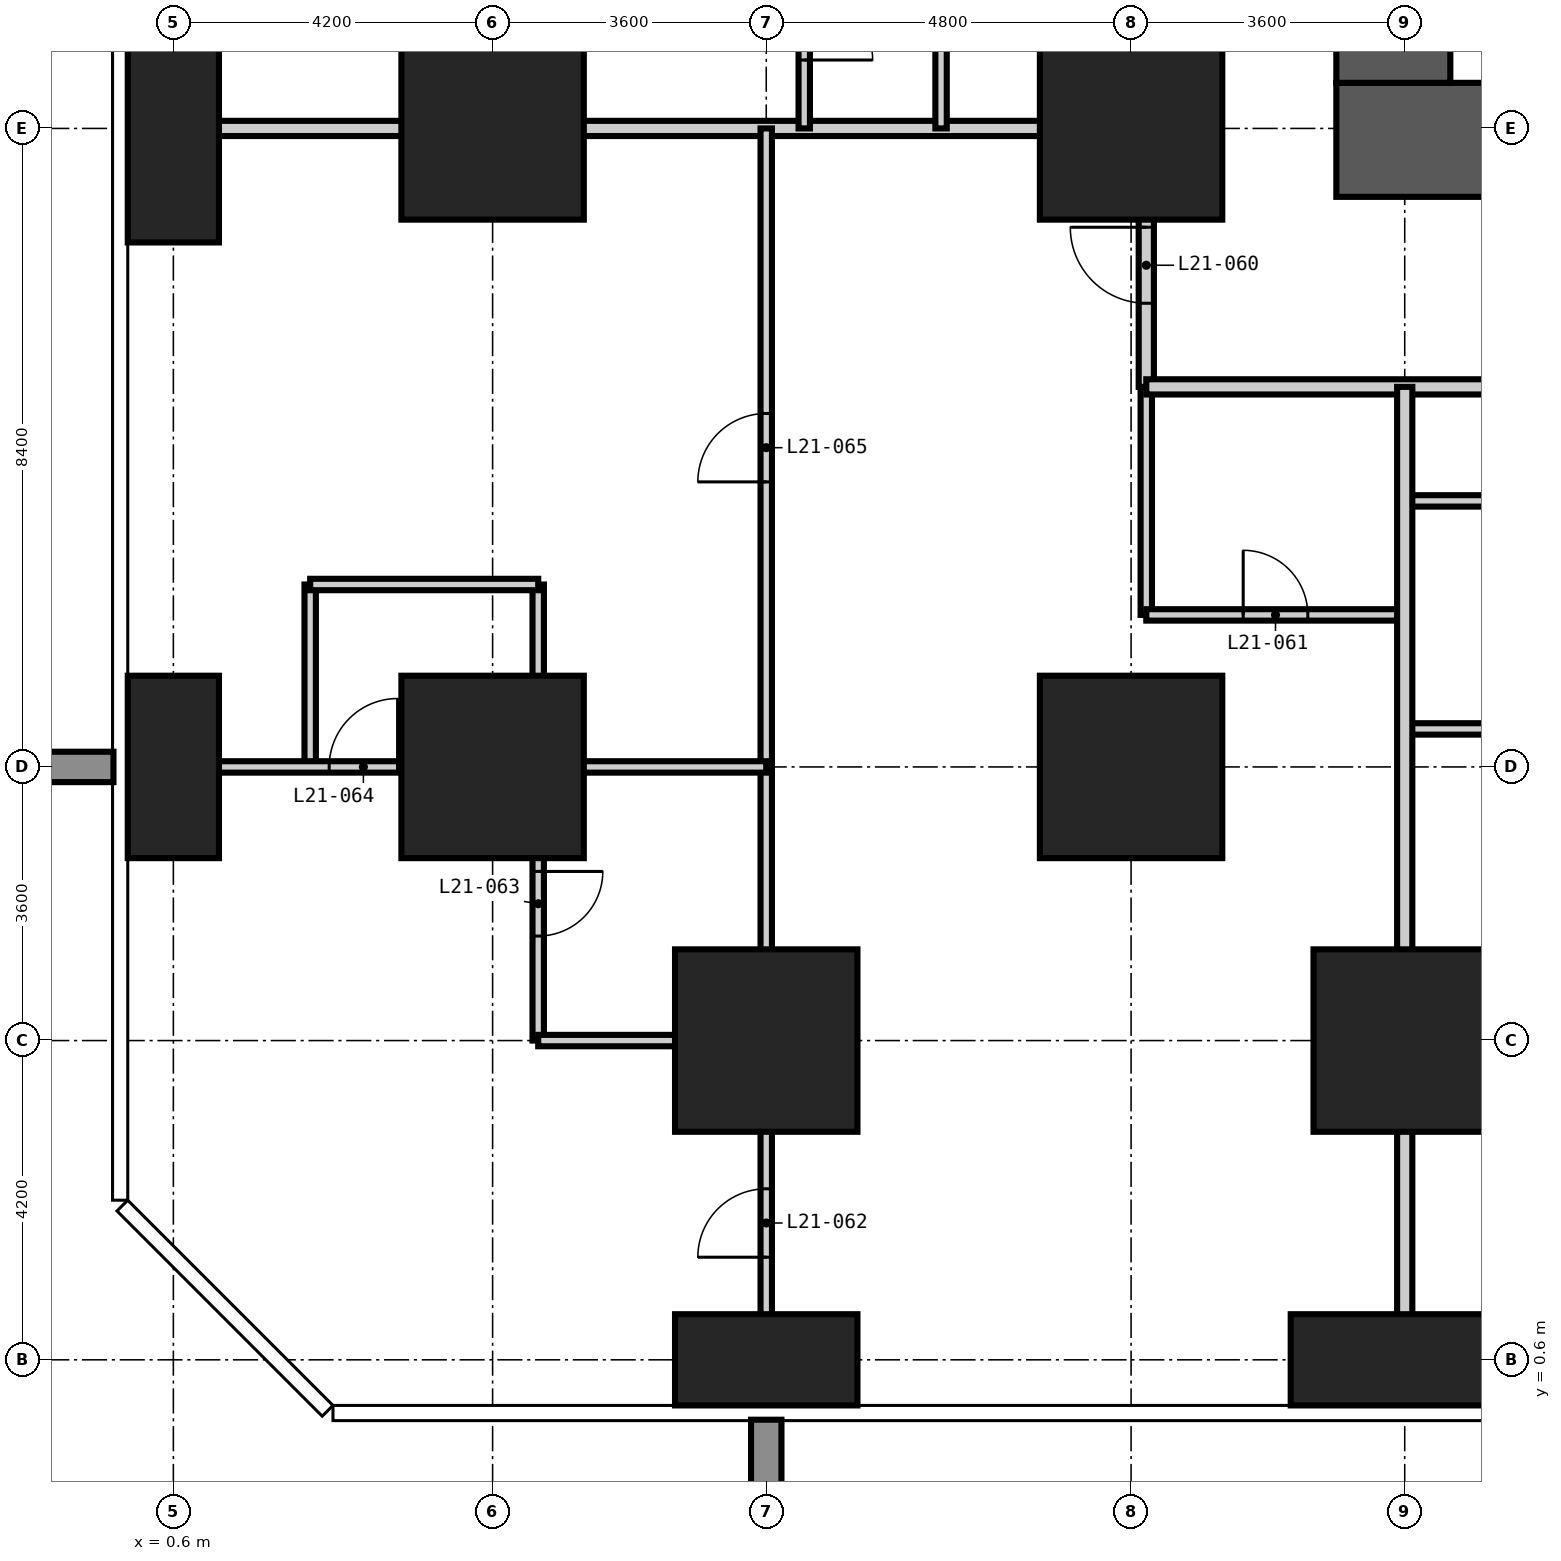
"""IFC4 building model, lengths in metres.
Left out: names, types, materials, properties, quantities, classifications, styles, units other than length and angle.
Written with IfcOpenShell. Run it as: python <this file> out.ifc"""

import sys

from ifc_helpers import new_model, si_unit, direction, frame, frame_2d, origin, origin_2d, place, context, subcontext, project, spatial, rectangle, extrude, element, fill, save


model = new_model("IFC4")
c1 = context("Model", 3, precision=1e-05, world=origin(), true_north=direction((0.0, 1.0)))
c2 = subcontext(c1, "Body", "Model", "MODEL_VIEW")
j1 = project(units=[si_unit("LENGTHUNIT", "METRE"), si_unit("PLANEANGLEUNIT", "RADIAN")], contexts=[c1])
p1 = place(None, origin())
s1 = spatial("IfcSite", under=j1, at=p1, CompositionType="ELEMENT")
p2 = place(p1, origin())
s2 = spatial("IfcBuilding", under=s1, at=p2, CompositionType="ELEMENT")
p3 = place(p2, frame((0.0, 0.0, 84.6)))
s3 = spatial("IfcBuildingStorey", under=s2, at=p3, CompositionType="ELEMENT", Elevation=84.6)
p4 = place(p3, frame((0.6, 8.4, -0.35), z_axis=(0.0, 0.0, 1.0), x_axis=(1.0, 0.0, 0.0)))
e1 = element("IfcColumn", 1, at=p4, inside=s3, PredefinedType="COLUMN", context=c2, shape_type="SweptSolid", body=[
    extrude(rectangle(XDim=1.2, YDim=2.4, at=origin_2d()), origin(), (0.0, 0.0, 1.0), 3.55),
])
p5 = place(p3, frame((0.6, 16.8, -0.35), z_axis=(0.0, 0.0, 1.0), x_axis=(1.0, 0.0, 0.0)))
e2 = element("IfcColumn", 2, at=p5, inside=s3, PredefinedType="COLUMN", context=c2, shape_type="SweptSolid", body=[
    extrude(rectangle(XDim=1.2, YDim=3.0, at=origin_2d()), origin(), (0.0, 0.0, 1.0), 3.55),
])
for number, where, z_axis, x_axis in (
    (3, (4.8, 8.4, -0.35), (0.0, 0.0, 1.0), (1.0, 0.0, 0.0)),
    (4, (4.8, 16.8, -0.35), (0.0, 0.0, 1.0), (1.0, 0.0, 0.0)),
):
    element("IfcColumn", number, at=place(p3, frame(where, z_axis=z_axis, x_axis=x_axis)), inside=s3, PredefinedType="COLUMN", context=c2, shape_type="SweptSolid", body=[
        extrude(rectangle(XDim=2.4, YDim=2.4, at=origin_2d()), origin(), (0.0, 0.0, 1.0), 3.55),
    ])
p6 = place(p3, frame((8.4, 0.6, -0.35), z_axis=(0.0, 0.0, 1.0), x_axis=(1.0, 0.0, 0.0)))
e5 = element("IfcColumn", 5, at=p6, inside=s3, PredefinedType="COLUMN", context=c2, shape_type="SweptSolid", body=[
    extrude(rectangle(XDim=2.4, YDim=1.2, at=origin_2d()), origin(), (0.0, 0.0, 1.0), 3.55),
])
for number, where, z_axis, x_axis in (
    (6, (8.4, 4.8, -0.35), (0.0, 0.0, 1.0), (1.0, 0.0, 0.0)),
    (7, (13.2, 8.4, -0.35), (0.0, 0.0, 1.0), (1.0, 0.0, 0.0)),
    (8, (13.2, 16.8, -0.35), (0.0, 0.0, 1.0), (1.0, 0.0, 0.0)),
):
    element("IfcColumn", number, at=place(p3, frame(where, z_axis=z_axis, x_axis=x_axis)), inside=s3, PredefinedType="COLUMN", context=c2, shape_type="SweptSolid", body=[
        extrude(rectangle(XDim=2.4, YDim=2.4, at=origin_2d()), origin(), (0.0, 0.0, 1.0), 3.55),
    ])
p7 = place(p3, frame((16.8, 0.6, -0.35), z_axis=(0.0, 0.0, 1.0), x_axis=(1.0, 0.0, 0.0)))
e9 = element("IfcColumn", 9, at=p7, inside=s3, PredefinedType="COLUMN", context=c2, shape_type="SweptSolid", body=[
    extrude(rectangle(XDim=3.0, YDim=1.2, at=origin_2d()), origin(), (0.0, 0.0, 1.0), 3.55),
])
p8 = place(p3, frame((16.8, 4.8, -0.35), z_axis=(0.0, 0.0, 1.0), x_axis=(1.0, 0.0, 0.0)))
e10 = element("IfcColumn", 10, at=p8, inside=s3, PredefinedType="COLUMN", context=c2, shape_type="SweptSolid", body=[
    extrude(rectangle(XDim=2.4, YDim=2.4, at=origin_2d()), origin(), (0.0, 0.0, 1.0), 3.55),
])
p9 = place(p3, frame((15.9, 16.65, -0.35), z_axis=(0.0, 0.0, 1.0), x_axis=(1.0, 0.0, 0.0)))
e11 = element("IfcWall", 11, at=p9, inside=s3, PredefinedType="SHEAR", context=c2, shape_type="SweptSolid", body=[
    extrude(rectangle(XDim=27.0, YDim=1.5, at=frame_2d((13.5, 0.0))), origin(), (0.0, 0.0, 1.0), 3.55),
])
p10 = place(p9, frame((13.0, 0.0, 0.35)))
e12 = element("IfcOpeningElement", 12, at=p10, cuts=e11, PredefinedType="OPENING", context=c2, shape_type="SweptSolid", body=[
    extrude(rectangle(XDim=1.0, YDim=2.1, at=frame_2d((0.5, 1.05))), frame((0.0, 0.76, 0.0), z_axis=(0.0, -1.0, 0.0), x_axis=(1.0, 0.0, 0.0)), (0.0, 0.0, 1.0), 1.52),
])
p11 = place(p9, frame((19.3, 0.0, 0.35)))
e13 = element("IfcOpeningElement", 13, at=p11, cuts=e11, PredefinedType="OPENING", context=c2, shape_type="SweptSolid", body=[
    extrude(rectangle(XDim=1.0, YDim=2.1, at=frame_2d((0.5, 1.05))), frame((0.0, 0.76, 0.0), z_axis=(0.0, -1.0, 0.0), x_axis=(1.0, 0.0, 0.0)), (0.0, 0.0, 1.0), 1.52),
])
p12 = place(p3, frame((16.65, 41.4, -0.35), z_axis=(0.0, 0.0, 1.0), x_axis=(0.0, -1.0, 0.0)))
e14 = element("IfcWall", 14, at=p12, inside=s3, PredefinedType="SHEAR", context=c2, shape_type="SweptSolid", body=[
    extrude(rectangle(XDim=24.0, YDim=1.5, at=frame_2d((12.0, 0.0))), origin(), (0.0, 0.0, 1.0), 3.55),
])
p13 = place(p12, frame((11.1, 0.0, 0.35)))
e15 = element("IfcOpeningElement", 15, at=p13, cuts=e14, PredefinedType="OPENING", context=c2, shape_type="SweptSolid", body=[
    extrude(rectangle(XDim=1.8, YDim=2.2, at=frame_2d((0.9, 1.1))), frame((0.0, 0.76, 0.0), z_axis=(0.0, -1.0, 0.0), x_axis=(1.0, 0.0, 0.0)), (0.0, 0.0, 1.0), 1.52),
])
p14 = place(p12, frame((19.9, 0.0, 0.35)))
e16 = element("IfcOpeningElement", 16, at=p14, cuts=e14, PredefinedType="OPENING", context=c2, shape_type="SweptSolid", body=[
    extrude(rectangle(XDim=1.0, YDim=2.1, at=frame_2d((0.5, 1.05))), frame((0.0, 0.76, 0.0), z_axis=(0.0, -1.0, 0.0), x_axis=(1.0, 0.0, 0.0)), (0.0, 0.0, 1.0), 1.52),
])
p15 = place(p12, frame((5.2, 0.0, 0.35)))
e17 = element("IfcOpeningElement", 17, at=p15, cuts=e14, PredefinedType="OPENING", context=c2, shape_type="SweptSolid", body=[
    extrude(rectangle(XDim=1.0, YDim=2.1, at=frame_2d((0.5, 1.05))), frame((0.0, 0.76, 0.0), z_axis=(0.0, -1.0, 0.0), x_axis=(1.0, 0.0, 0.0)), (0.0, 0.0, 1.0), 1.52),
])
p16 = place(p3, frame((5.4, 4.8, 0.0), z_axis=(0.0, 0.0, 1.0), x_axis=(0.0, 1.0, 0.0)))
e18 = element("IfcWall", 18, at=p16, inside=s3, PredefinedType="PARTITIONING", context=c2, shape_type="SweptSolid", body=[
    extrude(rectangle(XDim=3.6, YDim=0.15, at=frame_2d((1.8, 0.0))), origin(), (0.0, 0.0, 1.0), 3.2),
])
p17 = place(p16, frame((1.375, 0.0, 0.0)))
e19 = element("IfcOpeningElement", 19, at=p17, cuts=e18, PredefinedType="OPENING", context=c2, shape_type="SweptSolid", body=[
    extrude(rectangle(XDim=0.85, YDim=2.1, at=frame_2d((0.425, 1.05))), frame((0.0, 0.085, 0.0), z_axis=(0.0, -1.0, 0.0), x_axis=(1.0, 0.0, 0.0)), (0.0, 0.0, 1.0), 0.17),
])
for number, where, z_axis, x_axis in (
    (20, (13.4, 10.4, 0.0), (0.0, 0.0, 1.0), (0.0, 1.0, 0.0)),
    (21, (5.4, 4.8, 0.0), (0.0, 0.0, 1.0), (1.0, 0.0, 0.0)),
):
    element("IfcWall", number, at=place(p3, frame(where, z_axis=z_axis, x_axis=x_axis)), inside=s3, PredefinedType="PARTITIONING", context=c2, shape_type="SweptSolid", body=[
        extrude(rectangle(XDim=3.0, YDim=0.15, at=frame_2d((1.5, 0.0))), origin(), (0.0, 0.0, 1.0), 3.2),
    ])
p18 = place(p3, frame((16.8, 8.9, 0.0), z_axis=(0.0, 0.0, 1.0), x_axis=(1.0, 0.0, 0.0)))
e22 = element("IfcWall", 22, at=p18, inside=s3, PredefinedType="PARTITIONING", context=c2, shape_type="SweptSolid", body=[
    extrude(rectangle(XDim=2.7, YDim=0.15, at=frame_2d((1.35, 0.0))), origin(), (0.0, 0.0, 1.0), 3.2),
])
p19 = place(p3, frame((13.4, 10.4, 0.0), z_axis=(0.0, 0.0, 1.0), x_axis=(1.0, 0.0, 0.0)))
e23 = element("IfcWall", 23, at=p19, inside=s3, PredefinedType="PARTITIONING", context=c2, shape_type="SweptSolid", body=[
    extrude(rectangle(XDim=3.4, YDim=0.15, at=frame_2d((1.7, 0.0))), origin(), (0.0, 0.0, 1.0), 3.2),
])
p20 = place(p19, frame((1.275, 0.0, 0.0)))
e24 = element("IfcOpeningElement", 24, at=p20, cuts=e23, PredefinedType="OPENING", context=c2, shape_type="SweptSolid", body=[
    extrude(rectangle(XDim=0.85, YDim=2.1, at=frame_2d((0.425, 1.05))), frame((0.0, 0.085, 0.0), z_axis=(0.0, -1.0, 0.0), x_axis=(1.0, 0.0, 0.0)), (0.0, 0.0, 1.0), 0.17),
])
p21 = place(p3, frame((16.8, 11.9, 0.0), z_axis=(0.0, 0.0, 1.0), x_axis=(1.0, 0.0, 0.0)))
e25 = element("IfcWall", 25, at=p21, inside=s3, PredefinedType="PARTITIONING", context=c2, shape_type="SweptSolid", body=[
    extrude(rectangle(XDim=2.7, YDim=0.15, at=frame_2d((1.35, 0.0))), origin(), (0.0, 0.0, 1.0), 3.2),
])
p22 = place(p3, frame((13.4, 13.4, 0.0), z_axis=(0.0, 0.0, 1.0), x_axis=(0.0, 1.0, 0.0)))
e26 = element("IfcWall", 26, at=p22, inside=s3, PredefinedType="PARTITIONING", context=c2, shape_type="SweptSolid", body=[
    extrude(rectangle(XDim=22.6, YDim=0.2, at=frame_2d((11.3, 0.0))), origin(), (0.0, 0.0, 1.0), 3.2),
])
p23 = place(p22, frame((6.35, 0.0, 0.0)))
e27 = element("IfcOpeningElement", 27, at=p23, cuts=e26, PredefinedType="OPENING", context=c2, shape_type="SweptSolid", body=[
    extrude(rectangle(XDim=1.0, YDim=2.2, at=frame_2d((0.5, 1.1))), frame((0.0, 0.11, 0.0), z_axis=(0.0, -1.0, 0.0), x_axis=(1.0, 0.0, 0.0)), (0.0, 0.0, 1.0), 0.22),
])
p24 = place(p22, frame((13.1, 0.0, 0.0)))
e28 = element("IfcOpeningElement", 28, at=p24, cuts=e26, PredefinedType="OPENING", context=c2, shape_type="SweptSolid", body=[
    extrude(rectangle(XDim=1.0, YDim=2.2, at=frame_2d((0.5, 1.1))), frame((0.0, 0.11, 0.0), z_axis=(0.0, -1.0, 0.0), x_axis=(1.0, 0.0, 0.0)), (0.0, 0.0, 1.0), 0.22),
])
p25 = place(p22, frame((16.25, 0.0, 0.0)))
e29 = element("IfcOpeningElement", 29, at=p25, cuts=e26, PredefinedType="OPENING", context=c2, shape_type="SweptSolid", body=[
    extrude(rectangle(XDim=1.0, YDim=2.2, at=frame_2d((0.5, 1.1))), frame((0.0, 0.11, 0.0), z_axis=(0.0, -1.0, 0.0), x_axis=(1.0, 0.0, 0.0)), (0.0, 0.0, 1.0), 0.22),
])
p26 = place(p22, frame((1.1, 0.0, 0.0)))
e30 = element("IfcOpeningElement", 30, at=p26, cuts=e26, PredefinedType="OPENING", context=c2, shape_type="SweptSolid", body=[
    extrude(rectangle(XDim=1.0, YDim=2.2, at=frame_2d((0.5, 1.1))), frame((0.0, 0.11, 0.0), z_axis=(0.0, -1.0, 0.0), x_axis=(1.0, 0.0, 0.0)), (0.0, 0.0, 1.0), 0.22),
])
p27 = place(p3, frame((46.0, 13.4, 0.0), z_axis=(0.0, 0.0, 1.0), x_axis=(-1.0, 0.0, 0.0)))
e31 = element("IfcWall", 31, at=p27, inside=s3, PredefinedType="PARTITIONING", context=c2, shape_type="SweptSolid", body=[
    extrude(rectangle(XDim=32.6, YDim=0.2, at=frame_2d((16.3, 0.0))), origin(), (0.0, 0.0, 1.0), 3.2),
])
p28 = place(p27, frame((26.6, 0.0, 0.0)))
e32 = element("IfcOpeningElement", 32, at=p28, cuts=e31, PredefinedType="OPENING", context=c2, shape_type="SweptSolid", body=[
    extrude(rectangle(XDim=1.0, YDim=2.2, at=frame_2d((0.5, 1.1))), frame((0.0, 0.11, 0.0), z_axis=(0.0, -1.0, 0.0), x_axis=(1.0, 0.0, 0.0)), (0.0, 0.0, 1.0), 0.22),
])
p29 = place(p27, frame((19.1, 0.0, 0.0)))
e33 = element("IfcOpeningElement", 33, at=p29, cuts=e31, PredefinedType="OPENING", context=c2, shape_type="SweptSolid", body=[
    extrude(rectangle(XDim=1.0, YDim=2.2, at=frame_2d((0.5, 1.1))), frame((0.0, 0.11, 0.0), z_axis=(0.0, -1.0, 0.0), x_axis=(1.0, 0.0, 0.0)), (0.0, 0.0, 1.0), 0.22),
])
p30 = place(p27, frame((13.1, 0.0, 0.0)))
e34 = element("IfcOpeningElement", 34, at=p30, cuts=e31, PredefinedType="OPENING", context=c2, shape_type="SweptSolid", body=[
    extrude(rectangle(XDim=1.0, YDim=2.2, at=frame_2d((0.5, 1.1))), frame((0.0, 0.11, 0.0), z_axis=(0.0, -1.0, 0.0), x_axis=(1.0, 0.0, 0.0)), (0.0, 0.0, 1.0), 0.22),
])
p31 = place(p27, frame((5.6, 0.0, 0.0)))
e35 = element("IfcOpeningElement", 35, at=p31, cuts=e31, PredefinedType="OPENING", context=c2, shape_type="SweptSolid", body=[
    extrude(rectangle(XDim=1.0, YDim=2.2, at=frame_2d((0.5, 1.1))), frame((0.0, 0.11, 0.0), z_axis=(0.0, -1.0, 0.0), x_axis=(1.0, 0.0, 0.0)), (0.0, 0.0, 1.0), 0.22),
])
for number, where, z_axis, x_axis in (
    (36, (16.8, -0.008, 0.0), (0.0, 0.0, 1.0), (0.0, 1.0, 0.0)),
    (37, (-0.008, 16.8, 0.0), (0.0, 0.0, 1.0), (1.0, 0.0, 0.0)),
):
    element("IfcWall", number, at=place(p3, frame(where, z_axis=z_axis, x_axis=x_axis)), inside=s3, PredefinedType="PARTITIONING", context=c2, shape_type="SweptSolid", body=[
        extrude(rectangle(XDim=13.408, YDim=0.2, at=frame_2d((6.704, 0.0))), origin(), (0.0, 0.0, 1.0), 3.2),
    ])
for number, where, z_axis, x_axis in (
    (38, (2.4, 8.4, 0.0), (0.0, 0.0, 1.0), (0.0, 1.0, 0.0)),
    (39, (5.4, 8.4, 0.0), (0.0, 0.0, 1.0), (0.0, 1.0, 0.0)),
):
    element("IfcWall", number, at=place(p3, frame(where, z_axis=z_axis, x_axis=x_axis)), inside=s3, PredefinedType="PARTITIONING", context=c2, shape_type="SweptSolid", body=[
        extrude(rectangle(XDim=2.4, YDim=0.15, at=frame_2d((1.2, 0.0))), origin(), (0.0, 0.0, 1.0), 3.2),
    ])
p32 = place(p3, frame((8.4, -0.008, 0.0), z_axis=(0.0, 0.0, 1.0), x_axis=(0.0, 1.0, 0.0)))
e40 = element("IfcWall", 40, at=p32, inside=s3, PredefinedType="PARTITIONING", context=c2, shape_type="SweptSolid", body=[
    extrude(rectangle(XDim=16.808, YDim=0.15, at=frame_2d((8.404, 0.0))), origin(), (0.0, 0.0, 1.0), 3.2),
])
p33 = place(p32, frame((1.958, 0.0, 0.0)))
e41 = element("IfcOpeningElement", 41, at=p33, cuts=e40, PredefinedType="OPENING", context=c2, shape_type="SweptSolid", body=[
    extrude(rectangle(XDim=0.9, YDim=2.1, at=frame_2d((0.45, 1.05))), frame((0.0, 0.085, 0.0), z_axis=(0.0, -1.0, 0.0), x_axis=(1.0, 0.0, 0.0)), (0.0, 0.0, 1.0), 0.17),
])
p34 = place(p32, frame((12.158, 0.0, 0.0)))
e42 = element("IfcOpeningElement", 42, at=p34, cuts=e40, PredefinedType="OPENING", context=c2, shape_type="SweptSolid", body=[
    extrude(rectangle(XDim=0.9, YDim=2.1, at=frame_2d((0.45, 1.05))), frame((0.0, 0.085, 0.0), z_axis=(0.0, -1.0, 0.0), x_axis=(1.0, 0.0, 0.0)), (0.0, 0.0, 1.0), 0.17),
])
p35 = place(p3, frame((8.9, 16.8, 0.0), z_axis=(0.0, 0.0, 1.0), x_axis=(0.0, 1.0, 0.0)))
e43 = element("IfcWall", 43, at=p35, inside=s3, PredefinedType="PARTITIONING", context=c2, shape_type="SweptSolid", body=[
    extrude(rectangle(XDim=2.7, YDim=0.15, at=frame_2d((1.35, 0.0))), origin(), (0.0, 0.0, 1.0), 3.2),
])
p36 = place(p35, frame((0.9, 0.0, 0.0)))
e44 = element("IfcOpeningElement", 44, at=p36, cuts=e43, PredefinedType="OPENING", context=c2, shape_type="SweptSolid", body=[
    extrude(rectangle(XDim=0.9, YDim=2.1, at=frame_2d((0.45, 1.05))), frame((0.0, 0.085, 0.0), z_axis=(0.0, -1.0, 0.0), x_axis=(1.0, 0.0, 0.0)), (0.0, 0.0, 1.0), 0.17),
])
p37 = place(p3, frame((10.7, 16.8, 0.0), z_axis=(0.0, 0.0, 1.0), x_axis=(0.0, 1.0, 0.0)))
e45 = element("IfcWall", 45, at=p37, inside=s3, PredefinedType="PARTITIONING", context=c2, shape_type="SweptSolid", body=[
    extrude(rectangle(XDim=2.7, YDim=0.15, at=frame_2d((1.35, 0.0))), origin(), (0.0, 0.0, 1.0), 3.2),
])
p38 = place(p3, frame((-0.008, 8.4, 0.0), z_axis=(0.0, 0.0, 1.0), x_axis=(1.0, 0.0, 0.0)))
e46 = element("IfcWall", 46, at=p38, inside=s3, PredefinedType="PARTITIONING", context=c2, shape_type="SweptSolid", body=[
    extrude(rectangle(XDim=8.408, YDim=0.15, at=frame_2d((4.204, 0.0))), origin(), (0.0, 0.0, 1.0), 3.2),
])
p39 = place(p38, frame((2.658, 0.0, 0.0)))
e47 = element("IfcOpeningElement", 47, at=p39, cuts=e46, PredefinedType="OPENING", context=c2, shape_type="SweptSolid", body=[
    extrude(rectangle(XDim=0.9, YDim=2.1, at=frame_2d((0.45, 1.05))), frame((0.0, 0.085, 0.0), z_axis=(0.0, -1.0, 0.0), x_axis=(1.0, 0.0, 0.0)), (0.0, 0.0, 1.0), 0.17),
])
p40 = place(p3, frame((2.4, 10.8, 0.0), z_axis=(0.0, 0.0, 1.0), x_axis=(1.0, 0.0, 0.0)))
e48 = element("IfcWall", 48, at=p40, inside=s3, PredefinedType="PARTITIONING", context=c2, shape_type="SweptSolid", body=[
    extrude(rectangle(XDim=3.0, YDim=0.15, at=frame_2d((1.5, 0.0))), origin(), (0.0, 0.0, 1.0), 3.2),
])
p41 = place(p36, frame((0.9, 0.0, 0.0), z_axis=(0.0, 0.0, 1.0), x_axis=(-1.0, 0.0, 0.0)))
e49 = element("IfcDoor", 49, at=p41, inside=s3, OperationType="SINGLE_SWING_RIGHT", PredefinedType="DOOR", context=c2, shape_type="SweptSolid", body=[
    extrude(rectangle(XDim=0.9, YDim=2.1, at=frame_2d((0.45, 1.05))), frame((0.0, 0.025, 0.0), z_axis=(0.0, -1.0, 0.0), x_axis=(1.0, 0.0, 0.0)), (0.0, 0.0, 1.0), 0.05),
])
fill(e44, e49)
p42 = place(p26, origin())
e50 = element("IfcDoor", 50, at=p42, inside=s3, OperationType="SINGLE_SWING_RIGHT", PredefinedType="DOOR", context=c2, shape_type="SweptSolid", body=[
    extrude(rectangle(XDim=1.0, YDim=2.2, at=frame_2d((0.5, 1.1))), frame((0.0, 0.025, 0.0), z_axis=(0.0, -1.0, 0.0), x_axis=(1.0, 0.0, 0.0)), (0.0, 0.0, 1.0), 0.05),
])
fill(e30, e50)
p43 = place(p20, origin())
e51 = element("IfcDoor", 51, at=p43, inside=s3, OperationType="SINGLE_SWING_LEFT", PredefinedType="DOOR", context=c2, shape_type="SweptSolid", body=[
    extrude(rectangle(XDim=0.85, YDim=2.1, at=frame_2d((0.425, 1.05))), frame((0.0, 0.025, 0.0), z_axis=(0.0, -1.0, 0.0), x_axis=(1.0, 0.0, 0.0)), (0.0, 0.0, 1.0), 0.05),
])
fill(e24, e51)
p44 = place(p33, origin())
e52 = element("IfcDoor", 52, at=p44, inside=s3, OperationType="SINGLE_SWING_LEFT", PredefinedType="DOOR", context=c2, shape_type="SweptSolid", body=[
    extrude(rectangle(XDim=0.9, YDim=2.1, at=frame_2d((0.45, 1.05))), frame((0.0, 0.025, 0.0), z_axis=(0.0, -1.0, 0.0), x_axis=(1.0, 0.0, 0.0)), (0.0, 0.0, 1.0), 0.05),
])
fill(e41, e52)
p45 = place(p17, frame((0.85, 0.0, 0.0), z_axis=(0.0, 0.0, 1.0), x_axis=(-1.0, 0.0, 0.0)))
e53 = element("IfcDoor", 53, at=p45, inside=s3, OperationType="SINGLE_SWING_LEFT", PredefinedType="DOOR", context=c2, shape_type="SweptSolid", body=[
    extrude(rectangle(XDim=0.85, YDim=2.1, at=frame_2d((0.425, 1.05))), frame((0.0, 0.025, 0.0), z_axis=(0.0, -1.0, 0.0), x_axis=(1.0, 0.0, 0.0)), (0.0, 0.0, 1.0), 0.05),
])
fill(e19, e53)
p46 = place(p39, origin())
e54 = element("IfcDoor", 54, at=p46, inside=s3, OperationType="SINGLE_SWING_RIGHT", PredefinedType="DOOR", context=c2, shape_type="SweptSolid", body=[
    extrude(rectangle(XDim=0.9, YDim=2.1, at=frame_2d((0.45, 1.05))), frame((0.0, 0.025, 0.0), z_axis=(0.0, -1.0, 0.0), x_axis=(1.0, 0.0, 0.0)), (0.0, 0.0, 1.0), 0.05),
])
fill(e47, e54)
p47 = place(p34, origin())
e55 = element("IfcDoor", 55, at=p47, inside=s3, OperationType="SINGLE_SWING_LEFT", PredefinedType="DOOR", context=c2, shape_type="SweptSolid", body=[
    extrude(rectangle(XDim=0.9, YDim=2.1, at=frame_2d((0.45, 1.05))), frame((0.0, 0.025, 0.0), z_axis=(0.0, -1.0, 0.0), x_axis=(1.0, 0.0, 0.0)), (0.0, 0.0, 1.0), 0.05),
])
fill(e42, e55)
save(model, sys.argv[1])
